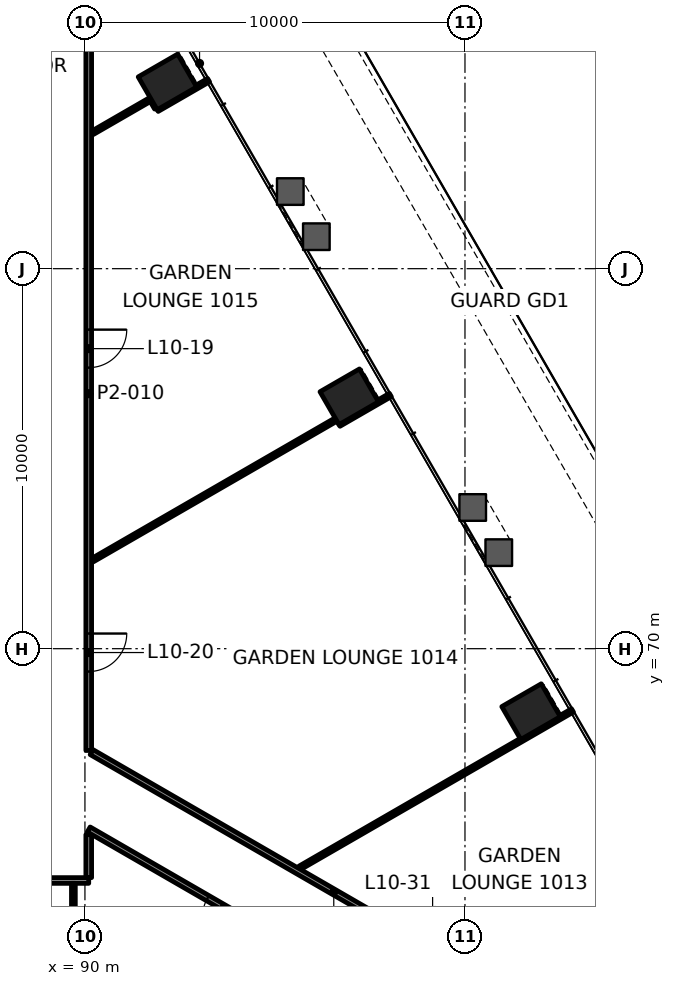
"""IFC4 building model, lengths in metres.
Left out: names, types, materials, properties, quantities, classifications, styles, units other than length and angle.
Written with IfcOpenShell. Run it as: python <this file> out.ifc"""

import sys

from ifc_helpers import new_model, si_unit, direction, frame, frame_2d, origin, origin_2d, place, context, subcontext, project, spatial, rectangle, extrude, element, fill, save


model = new_model("IFC4")
c1 = context("Model", 3, precision=1e-05, world=origin(), true_north=direction((0.0, 1.0)))
c2 = subcontext(c1, "Body", "Model", "MODEL_VIEW")
j1 = project(units=[si_unit("LENGTHUNIT", "METRE"), si_unit("PLANEANGLEUNIT", "RADIAN")], contexts=[c1])
p1 = place(None, origin())
s1 = spatial("IfcSite", under=j1, at=p1, CompositionType="ELEMENT")
p2 = place(p1, origin())
s2 = spatial("IfcBuilding", under=s1, at=p2, CompositionType="ELEMENT")
p3 = place(p2, frame((0.0, 0.0, 48.4)))
s3 = spatial("IfcBuildingStorey", under=s2, at=p3, CompositionType="ELEMENT", Elevation=48.4)
for number, where, z_axis, x_axis in (
    (1, (101.739, 68.343, -0.0), (0.0, 0.0, 1.0), (-0.5, 0.866, 0.0)),
    (2, (96.955, 76.628, -0.0), (0.0, 0.0, 1.0), (-0.5, 0.866, 0.0)),
    (3, (92.171, 84.914, -0.0), (0.0, 0.0, 1.0), (-0.5, 0.866, 0.0)),
):
    element("IfcColumn", number, at=place(p3, frame(where, z_axis=z_axis, x_axis=x_axis)), inside=s3, PredefinedType="COLUMN", context=c2, shape_type="SweptSolid", body=[
        extrude(rectangle(XDim=1.0, YDim=1.2, at=origin_2d()), origin(), (0.0, 0.0, 1.0), 4.2),
    ])
p4 = place(p3, frame((90.1, 63.9, 0.0), z_axis=(0.0, 0.0, 1.0), x_axis=(-1.0, 0.0, 0.0)))
e4 = element("IfcWall", 4, at=p4, inside=s3, PredefinedType="PARTITIONING", context=c2, shape_type="SweptSolid", body=[
    extrude(rectangle(XDim=30.2, YDim=0.15, at=frame_2d((15.1, 0.0))), origin(), (0.0, 0.0, 1.0), 3.4),
])
p5 = place(p4, frame((3.578, 0.0, 0.0)))
e5 = element("IfcOpeningElement", 5, at=p5, cuts=e4, PredefinedType="OPENING", context=c2, shape_type="SweptSolid", body=[
    extrude(rectangle(XDim=1.0, YDim=2.1, at=frame_2d((0.5, 1.05))), frame((0.0, 0.085, 0.0), z_axis=(0.0, -1.0, 0.0), x_axis=(1.0, 0.0, 0.0)), (0.0, 0.0, 1.0), 0.17),
])
p6 = place(p4, frame((10.926, 0.0, 0.0)))
e6 = element("IfcOpeningElement", 6, at=p6, cuts=e4, PredefinedType="OPENING", context=c2, shape_type="SweptSolid", body=[
    extrude(rectangle(XDim=1.0, YDim=2.1, at=frame_2d((0.5, 1.05))), frame((0.0, 0.085, 0.0), z_axis=(0.0, -1.0, 0.0), x_axis=(1.0, 0.0, 0.0)), (0.0, 0.0, 1.0), 0.17),
])
p7 = place(p4, frame((22.048, 0.0, 0.0)))
e7 = element("IfcOpeningElement", 7, at=p7, cuts=e4, PredefinedType="OPENING", context=c2, shape_type="SweptSolid", body=[
    extrude(rectangle(XDim=1.0, YDim=2.1, at=frame_2d((0.5, 1.05))), frame((0.0, 0.085, 0.0), z_axis=(0.0, -1.0, 0.0), x_axis=(1.0, 0.0, 0.0)), (0.0, 0.0, 1.0), 0.17),
])
p8 = place(p3, frame((95.653, 64.232, 0.0), z_axis=(0.0, 0.0, 1.0), x_axis=(0.866031516549, 0.499989412232, 0.0)))
e8 = element("IfcWall", 8, at=p8, inside=s3, PredefinedType="PARTITIONING", context=c2, shape_type="SweptSolid", body=[
    extrude(rectangle(XDim=8.286, YDim=0.1, at=frame_2d((4.143, 0.0))), origin(), (0.0, 0.0, 1.0), 3.4),
])
p9 = place(p3, frame((96.686, 75.896, 0.0), z_axis=(0.0, 0.0, 1.0), x_axis=(0.866018739521, 0.500011542666, 0.0)))
e9 = element("IfcWall", 9, at=p9, inside=s3, PredefinedType="PARTITIONING", context=c2, shape_type="SweptSolid", body=[
    extrude(rectangle(XDim=1.56, YDim=0.1, at=frame_2d((0.78, 0.0))), origin(), (0.0, 0.0, 1.0), 3.165),
])
p10 = place(p3, frame((90.201, 72.331, 0.0), z_axis=(0.0, 0.0, 1.0), x_axis=(0.866022913937, 0.500004312517, 0.0)))
e10 = element("IfcWall", 10, at=p10, inside=s3, PredefinedType="PARTITIONING", context=c2, shape_type="SweptSolid", body=[
    extrude(rectangle(XDim=7.398, YDim=0.1, at=frame_2d((3.699, 0.0))), origin(), (0.0, 0.0, 1.0), 3.4),
])
p11 = place(p3, frame((91.902, 84.181, 0.0), z_axis=(0.0, 0.0, 1.0), x_axis=(0.866018739521, 0.500011542666, 0.0)))
e11 = element("IfcWall", 11, at=p11, inside=s3, PredefinedType="PARTITIONING", context=c2, shape_type="SweptSolid", body=[
    extrude(rectangle(XDim=1.56, YDim=0.1, at=frame_2d((0.78, 0.0))), origin(), (0.0, 0.0, 1.0), 3.165),
])
p12 = place(p3, frame((90.201, 83.577, 0.0), z_axis=(0.0, 0.0, 1.0), x_axis=(0.866016025414, 0.500016243463, 0.0)))
e12 = element("IfcWall", 12, at=p12, inside=s3, PredefinedType="PARTITIONING", context=c2, shape_type="SweptSolid", body=[
    extrude(rectangle(XDim=1.774, YDim=0.1, at=frame_2d((0.887, 0.0))), origin(), (0.0, 0.0, 1.0), 3.4),
])
p13 = place(p3, frame((90.1, 63.976, 0.0), z_axis=(0.0, 0.0, 1.0), x_axis=(0.0, 1.0, 0.0)))
e13 = element("IfcWall", 13, at=p13, inside=s3, PredefinedType="PARTITIONING", context=c2, shape_type="SweptSolid", body=[
    extrude(rectangle(XDim=1.131, YDim=0.15, at=frame_2d((0.565, 0.0))), origin(), (0.0, 0.0, 1.0), 3.247),
])
p14 = place(p3, frame((90.1, 86.1, 0.0), z_axis=(0.0, 0.0, 1.0), x_axis=(0.0, -1.0, 0.0)))
e14 = element("IfcWall", 14, at=p14, inside=s3, PredefinedType="PARTITIONING", context=c2, shape_type="SweptSolid", body=[
    extrude(rectangle(XDim=18.778, YDim=0.15, at=frame_2d((9.389, 0.0))), origin(), (0.0, 0.0, 1.0), 3.4),
])
p15 = place(p14, frame((7.704, 0.0, 0.0)))
e15 = element("IfcOpeningElement", 15, at=p15, cuts=e14, PredefinedType="OPENING", context=c2, shape_type="SweptSolid", body=[
    extrude(rectangle(XDim=1.0, YDim=2.1, at=frame_2d((0.5, 1.05))), frame((0.0, 0.085, 0.0), z_axis=(0.0, -1.0, 0.0), x_axis=(1.0, 0.0, 0.0)), (0.0, 0.0, 1.0), 0.17),
])
p16 = place(p14, frame((15.701, 0.0, 0.0)))
e16 = element("IfcOpeningElement", 16, at=p16, cuts=e14, PredefinedType="OPENING", context=c2, shape_type="SweptSolid", body=[
    extrude(rectangle(XDim=1.0, YDim=2.1, at=frame_2d((0.5, 1.05))), frame((0.0, 0.085, 0.0), z_axis=(0.0, -1.0, 0.0), x_axis=(1.0, 0.0, 0.0)), (0.0, 0.0, 1.0), 0.17),
])
p17 = place(p3, frame((89.696, 54.212, 0.0), z_axis=(0.0, 0.0, 1.0), x_axis=(0.0, 1.0, 0.0)))
e17 = element("IfcWall", 17, at=p17, inside=s3, PredefinedType="PARTITIONING", context=c2, shape_type="SweptSolid", body=[
    extrude(rectangle(XDim=9.613, YDim=0.1, at=frame_2d((4.806, 0.0))), origin(), (0.0, 0.0, 1.0), 3.165),
])
p18 = place(p3, frame((91.877, 84.225, 0.0), z_axis=(0.0, 0.0, 1.0), x_axis=(-0.500313526201, 0.865844313662, 0.0)))
e18 = element("IfcWall", 18, at=p18, inside=s3, PredefinedType="PARTITIONING", context=c2, shape_type="SweptSolid", body=[
    extrude(rectangle(XDim=0.226, YDim=0.1, at=frame_2d((0.113, 0.0))), origin(), (0.0, 0.0, 1.0), 3.4),
])
p19 = place(p3, frame((90.175, 67.278, 0.0), z_axis=(0.0, 0.0, 1.0), x_axis=(0.866025356753, -0.50000008146, 0.0)))
e19 = element("IfcWall", 19, at=p19, inside=s3, PredefinedType="PARTITIONING", context=c2, shape_type="SweptSolid", body=[
    extrude(rectangle(XDim=14.717, YDim=0.15, at=frame_2d((7.358, 0.0))), origin(), (0.0, 0.0, 1.0), 3.4),
])
p20 = place(p19, frame((9.861, 0.0, 0.0)))
e20 = element("IfcOpeningElement", 20, at=p20, cuts=e19, PredefinedType="OPENING", context=c2, shape_type="SweptSolid", body=[
    extrude(rectangle(XDim=1.0, YDim=2.1, at=frame_2d((0.5, 1.05))), frame((0.0, 0.085, 0.0), z_axis=(0.0, -1.0, 0.0), x_axis=(1.0, 0.0, 0.0)), (0.0, 0.0, 1.0), 0.17),
])
p21 = place(p3, frame((102.021, 58.361, 0.0), z_axis=(0.0, 0.0, 1.0), x_axis=(-0.866027566471, 0.499996254098, 0.0)))
e21 = element("IfcWall", 21, at=p21, inside=s3, PredefinedType="PARTITIONING", context=c2, shape_type="SweptSolid", body=[
    extrude(rectangle(XDim=13.765, YDim=0.15, at=frame_2d((6.882, 0.0))), origin(), (0.0, 0.0, 1.0), 3.247),
])
p22 = place(p21, frame((2.475, 0.0, 0.0)))
e22 = element("IfcOpeningElement", 22, at=p22, cuts=e21, PredefinedType="OPENING", context=c2, shape_type="SweptSolid", body=[
    extrude(rectangle(XDim=1.0, YDim=2.1, at=frame_2d((0.5, 1.05))), frame((0.0, 0.085, 0.0), z_axis=(0.0, -1.0, 0.0), x_axis=(1.0, 0.0, 0.0)), (0.0, 0.0, 1.0), 0.17),
])
p23 = place(p21, frame((9.154, 0.0, 0.0)))
e23 = element("IfcOpeningElement", 23, at=p23, cuts=e21, PredefinedType="OPENING", context=c2, shape_type="SweptSolid", body=[
    extrude(rectangle(XDim=1.0, YDim=2.1, at=frame_2d((0.5, 1.05))), frame((0.0, 0.085, 0.0), z_axis=(0.0, -1.0, 0.0), x_axis=(1.0, 0.0, 0.0)), (0.0, 0.0, 1.0), 0.17),
])
p24 = place(p3, frame((110.994, 61.012, 0.0), z_axis=(0.0, 0.0, 1.0), x_axis=(-0.500000104629, 0.866025343377, 0.0)))
e24 = element("IfcWall", 24, at=p24, inside=s3, PredefinedType="SOLIDWALL", context=c2, shape_type="SweptSolid", body=[
    extrude(rectangle(XDim=41.178, YDim=0.8, at=frame_2d((20.589, 0.0))), origin(), (0.0, 0.0, 1.0), 0.9),
])
p25 = place(p15, origin())
e25 = element("IfcDoor", 25, at=p25, inside=s3, OperationType="SINGLE_SWING_LEFT", PredefinedType="DOOR", context=c2, shape_type="SweptSolid", body=[
    extrude(rectangle(XDim=1.0, YDim=2.1, at=frame_2d((0.5, 1.05))), frame((0.0, 0.025, 0.0), z_axis=(0.0, -1.0, 0.0), x_axis=(1.0, 0.0, 0.0)), (0.0, 0.0, 1.0), 0.05),
])
fill(e15, e25)
p26 = place(p16, origin())
e26 = element("IfcDoor", 26, at=p26, inside=s3, OperationType="SINGLE_SWING_RIGHT", PredefinedType="DOOR", context=c2, shape_type="SweptSolid", body=[
    extrude(rectangle(XDim=1.0, YDim=2.1, at=frame_2d((0.5, 1.05))), frame((0.0, 0.025, 0.0), z_axis=(0.0, -1.0, 0.0), x_axis=(1.0, 0.0, 0.0)), (0.0, 0.0, 1.0), 0.05),
])
fill(e16, e26)
p27 = place(p23, origin())
e27 = element("IfcDoor", 27, at=p27, inside=s3, OperationType="SINGLE_SWING_RIGHT", PredefinedType="DOOR", context=c2, shape_type="SweptSolid", body=[
    extrude(rectangle(XDim=1.0, YDim=2.1, at=frame_2d((0.5, 1.05))), frame((0.0, 0.025, 0.0), z_axis=(0.0, -1.0, 0.0), x_axis=(1.0, 0.0, 0.0)), (0.0, 0.0, 1.0), 0.05),
])
fill(e23, e27)
save(model, sys.argv[1])
